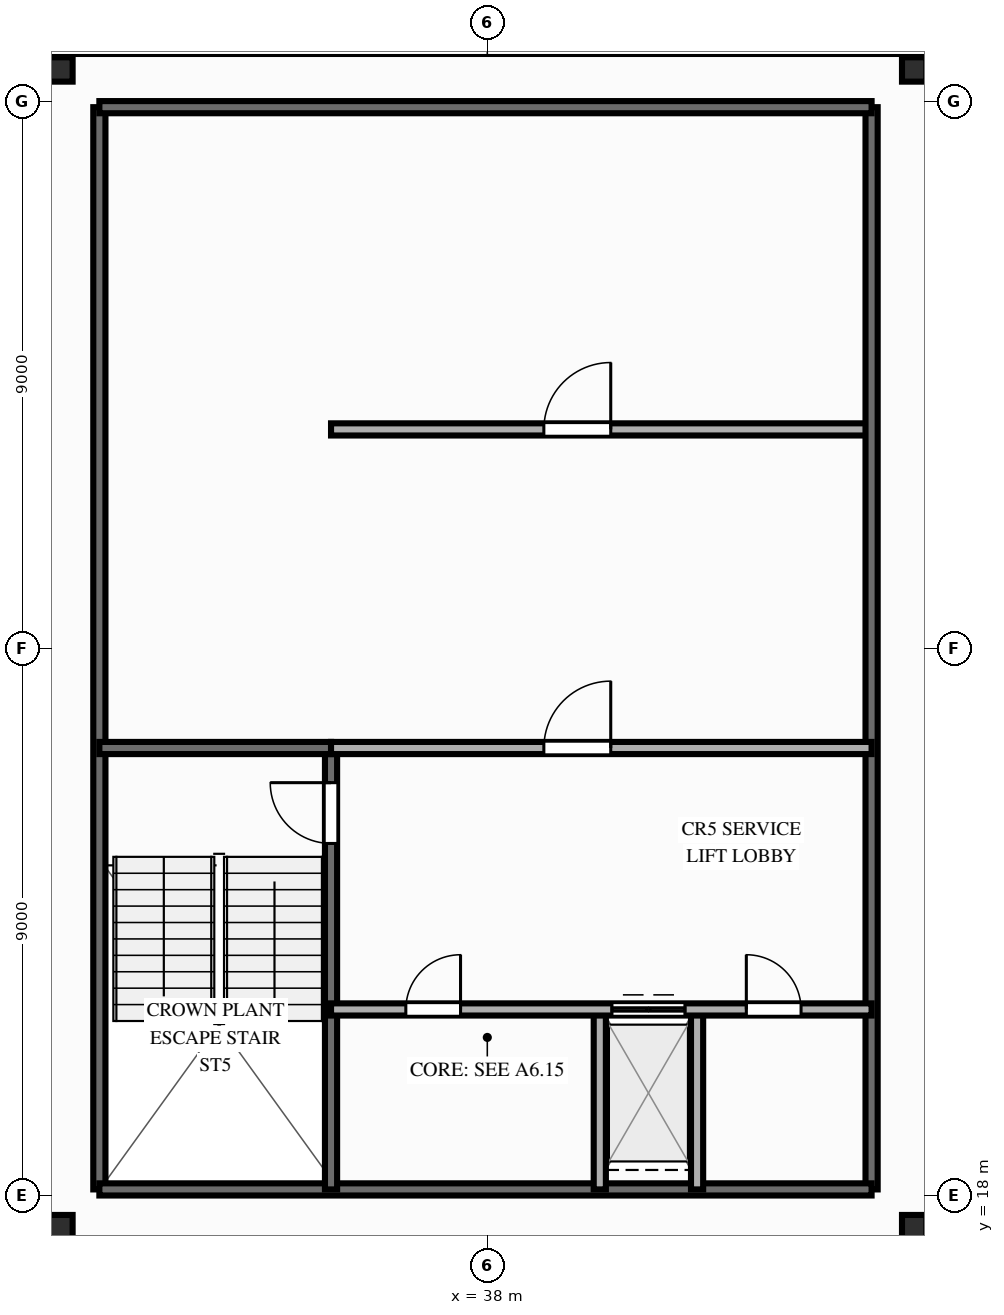
"""IFC4 building model, lengths in metres.
Left out: names, types, materials, properties, quantities, classifications, styles, units other than length and angle.
Written with IfcOpenShell. Run it as: python <this file> out.ifc"""

import sys

from ifc_helpers import new_model, si_unit, direction, frame, frame_2d, origin, origin_2d, place, context, subcontext, project, spatial, rectangle, i_section, extrude, source, transform, mapped, element, fill, save


model = new_model("IFC4")
c1 = context("Model", 3, precision=1e-05, world=origin(), true_north=direction((0.0, 1.0)))
c2 = subcontext(c1, "Body", "Model", "MODEL_VIEW")
j1 = project(units=[si_unit("LENGTHUNIT", "METRE"), si_unit("PLANEANGLEUNIT", "RADIAN")], contexts=[c1])
p1 = place(None, origin())
s1 = spatial("IfcSite", under=j1, at=p1, CompositionType="ELEMENT")
p2 = place(p1, origin())
s2 = spatial("IfcBuilding", under=s1, at=p2, CompositionType="ELEMENT")
p3 = place(p2, frame((0.0, 0.0, 267.4)))
s3 = spatial("IfcBuildingStorey", under=s2, at=p3, CompositionType="ELEMENT", Elevation=267.4)
m1 = source(origin(), c2, "Body", "SweptSolid", [
    extrude(i_section(OverallWidth=0.4, OverallDepth=0.4, WebThickness=0.013, FlangeThickness=0.021, at=origin_2d()), origin(), (0.0, 0.0, 1.0), 3.8),
])
for number, where, z_axis, x_axis in (
    (1, (30.98, 17.48, 0.0), (0.0, 0.0, 1.0), (1.0, 0.0, 0.0)),
    (2, (45.02, 17.48, 0.0), (0.0, 0.0, 1.0), (1.0, 0.0, 0.0)),
    (3, (30.98, 36.52, 0.0), (0.0, 0.0, 1.0), (1.0, 0.0, 0.0)),
    (4, (45.02, 36.52, 0.0), (0.0, 0.0, 1.0), (1.0, 0.0, 0.0)),
):
    element("IfcColumn", number, at=place(p3, frame(where, z_axis=z_axis, x_axis=x_axis)), inside=s3, PredefinedType="COLUMN", context=c2, shape_type="MappedRepresentation", body=[
        mapped(m1, transform((0.0, 0.0, 0.0), scale=1.0)),
    ])
p4 = place(p3, frame((35.43, 30.6, 0.0), z_axis=(0.0, 0.0, 1.0), x_axis=(1.0, 0.0, 0.0)))
e5 = element("IfcWall", 5, at=p4, inside=s3, PredefinedType="PARTITIONING", context=c2, shape_type="SweptSolid", body=[
    extrude(rectangle(XDim=8.89, YDim=0.2, at=frame_2d((4.445, 0.0))), origin(), (0.0, 0.0, 1.0), 3.55),
])
p5 = place(p4, frame((3.5, 0.0, 0.0)))
e6 = element("IfcOpeningElement", 6, at=p5, cuts=e5, PredefinedType="OPENING", context=c2, shape_type="SweptSolid", body=[
    extrude(rectangle(XDim=1.1, YDim=2.15, at=frame_2d((0.55, 1.075))), frame((0.0, 0.112, 0.0), z_axis=(0.0, -1.0, 0.0), x_axis=(1.0, 0.0, 0.0)), (0.0, 0.0, 1.0), 0.224),
])
for number, where, z_axis, x_axis in (
    (7, (31.62, 18.1, 0.0), (0.0, 0.0, 1.0), (0.0, 1.0, 0.0)),
    (8, (44.32, 18.1, 0.0), (0.0, 0.0, 1.0), (0.0, 1.0, 0.0)),
):
    element("IfcWall", number, at=place(p3, frame(where, z_axis=z_axis, x_axis=x_axis)), inside=s3, PredefinedType="SOLIDWALL", context=c2, shape_type="SweptSolid", body=[
        extrude(rectangle(XDim=17.8, YDim=0.2, at=frame_2d((8.9, 0.0))), origin(), (0.0, 0.0, 1.0), 3.55),
    ])
for number, where, z_axis, x_axis in (
    (9, (31.62, 18.1, 0.0), (0.0, 0.0, 1.0), (1.0, 0.0, 0.0)),
    (10, (31.62, 35.9, 0.0), (0.0, 0.0, 1.0), (1.0, 0.0, 0.0)),
):
    element("IfcWall", number, at=place(p3, frame(where, z_axis=z_axis, x_axis=x_axis)), inside=s3, PredefinedType="SOLIDWALL", context=c2, shape_type="SweptSolid", body=[
        extrude(rectangle(XDim=12.7, YDim=0.2, at=frame_2d((6.35, 0.0))), origin(), (0.0, 0.0, 1.0), 3.55),
    ])
p6 = place(p3, frame((35.43, 18.1, 0.0), z_axis=(0.0, 0.0, 1.0), x_axis=(0.0, 1.0, 0.0)))
e11 = element("IfcWall", 11, at=p6, inside=s3, PredefinedType="SOLIDWALL", context=c2, shape_type="SweptSolid", body=[
    extrude(rectangle(XDim=7.26, YDim=0.2, at=frame_2d((3.63, 0.0))), origin(), (0.0, 0.0, 1.0), 3.55),
])
p7 = place(p6, frame((6.69, 0.0, 0.0), z_axis=(0.0, 0.0, 1.0), x_axis=(-1.0, 0.0, 0.0)))
e12 = element("IfcOpeningElement", 12, at=p7, cuts=e11, PredefinedType="OPENING", context=c2, shape_type="SweptSolid", body=[
    extrude(rectangle(XDim=1.0, YDim=2.15, at=frame_2d((0.5, 1.075))), frame((0.0, 0.112, 0.0), z_axis=(0.0, -1.0, 0.0), x_axis=(1.0, 0.0, 0.0)), (0.0, 0.0, 1.0), 0.224),
])
p8 = place(p3, frame((31.62, 25.36, 0.0), z_axis=(0.0, 0.0, 1.0), x_axis=(1.0, 0.0, 0.0)))
e13 = element("IfcWall", 13, at=p8, inside=s3, PredefinedType="SOLIDWALL", context=c2, shape_type="SweptSolid", body=[
    extrude(rectangle(XDim=3.81, YDim=0.2, at=frame_2d((1.905, 0.0))), origin(), (0.0, 0.0, 1.0), 3.55),
])
for number, where, z_axis, x_axis in (
    (14, (39.85, 18.1, 0.0), (0.0, 0.0, 1.0), (0.0, 1.0, 0.0)),
    (15, (41.45, 18.1, 0.0), (0.0, 0.0, 1.0), (0.0, 1.0, 0.0)),
):
    element("IfcWall", number, at=place(p3, frame(where, z_axis=z_axis, x_axis=x_axis)), inside=s3, PredefinedType="PARTITIONING", context=c2, shape_type="SweptSolid", body=[
        extrude(rectangle(XDim=2.96, YDim=0.2, at=frame_2d((1.48, 0.0))), origin(), (0.0, 0.0, 1.0), 3.55),
    ])
p9 = place(p3, frame((35.43, 21.06, 0.0), z_axis=(0.0, 0.0, 1.0), x_axis=(1.0, 0.0, 0.0)))
e16 = element("IfcWall", 16, at=p9, inside=s3, PredefinedType="PARTITIONING", context=c2, shape_type="SweptSolid", body=[
    extrude(rectangle(XDim=8.89, YDim=0.2, at=frame_2d((4.445, 0.0))), origin(), (0.0, 0.0, 1.0), 3.55),
])
p10 = place(p9, frame((1.23, 0.0, 0.0)))
e17 = element("IfcOpeningElement", 17, at=p10, cuts=e16, PredefinedType="OPENING", context=c2, shape_type="SweptSolid", body=[
    extrude(rectangle(XDim=0.9, YDim=2.1, at=frame_2d((0.45, 1.05))), frame((0.0, 0.112, 0.0), z_axis=(0.0, -1.0, 0.0), x_axis=(1.0, 0.0, 0.0)), (0.0, 0.0, 1.0), 0.224),
])
p11 = place(p9, frame((4.62, 0.0, 0.0)))
e18 = element("IfcOpeningElement", 18, at=p11, cuts=e16, PredefinedType="OPENING", context=c2, shape_type="SweptSolid", body=[
    extrude(rectangle(XDim=1.2, YDim=2.15, at=frame_2d((0.6, 1.075))), frame((0.0, 0.112, 0.0), z_axis=(0.0, -1.0, 0.0), x_axis=(1.0, 0.0, 0.0)), (0.0, 0.0, 1.0), 0.224),
])
p12 = place(p9, frame((6.83, 0.0, 0.0)))
e19 = element("IfcOpeningElement", 19, at=p12, cuts=e16, PredefinedType="OPENING", context=c2, shape_type="SweptSolid", body=[
    extrude(rectangle(XDim=0.9, YDim=2.1, at=frame_2d((0.45, 1.05))), frame((0.0, 0.112, 0.0), z_axis=(0.0, -1.0, 0.0), x_axis=(1.0, 0.0, 0.0)), (0.0, 0.0, 1.0), 0.224),
])
p13 = place(p3, frame((35.43, 25.36, 0.0), z_axis=(0.0, 0.0, 1.0), x_axis=(1.0, 0.0, 0.0)))
e20 = element("IfcWall", 20, at=p13, inside=s3, PredefinedType="PARTITIONING", context=c2, shape_type="SweptSolid", body=[
    extrude(rectangle(XDim=8.89, YDim=0.2, at=frame_2d((4.445, 0.0))), origin(), (0.0, 0.0, 1.0), 2.952),
])
p14 = place(p13, frame((3.5, 0.0, 0.0)))
e21 = element("IfcOpeningElement", 21, at=p14, cuts=e20, PredefinedType="OPENING", context=c2, shape_type="SweptSolid", body=[
    extrude(rectangle(XDim=1.1, YDim=2.15, at=frame_2d((0.55, 1.075))), frame((0.0, 0.112, 0.0), z_axis=(0.0, -1.0, 0.0), x_axis=(1.0, 0.0, 0.0)), (0.0, 0.0, 1.0), 0.224),
])
m2 = source(origin(), c2, "Body", "SweptSolid", [
    extrude(rectangle(XDim=1.1, YDim=2.15, at=frame_2d((0.55, 1.075))), frame((0.0, 0.025, 0.0), z_axis=(0.0, -1.0, 0.0), x_axis=(1.0, 0.0, 0.0)), (0.0, 0.0, 1.0), 0.05),
])
p15 = place(p5, origin())
e22 = element("IfcDoor", 22, at=p15, inside=s3, OperationType="SINGLE_SWING_RIGHT", PredefinedType="DOOR", context=c2, shape_type="MappedRepresentation", body=[
    mapped(m2, transform((0.0, 0.0, 0.0), scale=1.0)),
])
fill(e6, e22)
m3 = source(origin(), c2, "Body", "SweptSolid", [
    extrude(rectangle(XDim=1.0, YDim=2.15, at=frame_2d((0.5, 1.075))), frame((0.0, 0.025, 0.0), z_axis=(0.0, -1.0, 0.0), x_axis=(1.0, 0.0, 0.0)), (0.0, 0.0, 1.0), 0.05),
])
p16 = place(p7, origin())
e23 = element("IfcDoor", 23, at=p16, inside=s3, OperationType="SINGLE_SWING_LEFT", PredefinedType="DOOR", context=c2, shape_type="MappedRepresentation", body=[
    mapped(m3, transform((0.0, 0.0, 0.0), scale=1.0)),
])
fill(e12, e23)
m4 = source(origin(), c2, "Body", "SweptSolid", [
    extrude(rectangle(XDim=0.9, YDim=2.1, at=frame_2d((0.45, 1.05))), frame((0.0, 0.025, 0.0), z_axis=(0.0, -1.0, 0.0), x_axis=(1.0, 0.0, 0.0)), (0.0, 0.0, 1.0), 0.05),
])
p17 = place(p10, origin())
e24 = element("IfcDoor", 24, at=p17, inside=s3, OperationType="SINGLE_SWING_RIGHT", PredefinedType="DOOR", context=c2, shape_type="MappedRepresentation", body=[
    mapped(m4, transform((0.0, 0.0, 0.0), scale=1.0)),
])
fill(e17, e24)
m5 = source(origin(), c2, "Body", "SweptSolid", [
    extrude(rectangle(XDim=1.2, YDim=2.15, at=frame_2d((0.6, 1.075))), frame((0.0, 0.025, 0.0), z_axis=(0.0, -1.0, 0.0), x_axis=(1.0, 0.0, 0.0)), (0.0, 0.0, 1.0), 0.05),
])
p18 = place(p11, origin())
e25 = element("IfcDoor", 25, at=p18, inside=s3, OperationType="DOUBLE_DOOR_SLIDING", PredefinedType="DOOR", context=c2, shape_type="MappedRepresentation", body=[
    mapped(m5, transform((0.0, 0.0, 0.0), scale=1.0)),
])
fill(e18, e25)
p19 = place(p12, origin())
e26 = element("IfcDoor", 26, at=p19, inside=s3, OperationType="SINGLE_SWING_LEFT", PredefinedType="DOOR", context=c2, shape_type="MappedRepresentation", body=[
    mapped(m4, transform((0.0, 0.0, 0.0), scale=1.0)),
])
fill(e19, e26)
p20 = place(p14, origin())
e27 = element("IfcDoor", 27, at=p20, inside=s3, OperationType="SINGLE_SWING_RIGHT", PredefinedType="DOOR", context=c2, shape_type="MappedRepresentation", body=[
    mapped(m2, transform((0.0, 0.0, 0.0), scale=1.0)),
])
fill(e21, e27)
save(model, sys.argv[1])
